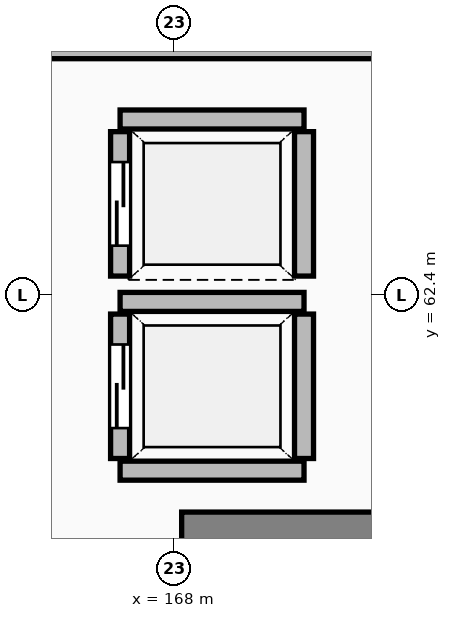
"""IFC4 building model, lengths in metres.
Left out: names, types, materials, properties, quantities, classifications, styles, units other than length and angle.
Written with IfcOpenShell. Run it as: python <this file> out.ifc"""

import sys

from ifc_helpers import new_model, si_unit, direction, frame, frame_2d, origin, place, context, subcontext, project, spatial, rectangle, extrude, element, fill, save


model = new_model("IFC4")
c1 = context("Model", 3, precision=1e-05, world=origin(), true_north=direction((0.0, 1.0)))
c2 = subcontext(c1, "Body", "Model", "MODEL_VIEW")
j1 = project(units=[si_unit("LENGTHUNIT", "METRE"), si_unit("PLANEANGLEUNIT", "RADIAN")], contexts=[c1])
p1 = place(None, origin())
s1 = spatial("IfcSite", under=j1, at=p1, CompositionType="ELEMENT")
p2 = place(p1, origin())
s2 = spatial("IfcBuilding", under=s1, at=p2, CompositionType="ELEMENT")
p3 = place(p2, origin())
s3 = spatial("IfcBuildingStorey", under=s2, at=p3, CompositionType="ELEMENT", Elevation=0.0)
p4 = place(p3, frame((168.1, 59.32, 0.0), z_axis=(0.0, 0.0, 1.0), x_axis=(1.0, 0.0, 0.0)))
e1 = element("IfcWall", 1, at=p4, inside=s3, PredefinedType="SHEAR", context=c2, shape_type="SweptSolid", body=[
    extrude(rectangle(XDim=3.67, YDim=0.45, at=frame_2d((1.835, 0.0))), origin(), (0.0, 0.0, 1.0), 5.7),
])
for number, where, z_axis, x_axis in (
    (2, (167.29, 60.09, 0.0), (0.0, 0.0, 1.0), (1.0, 0.0, 0.0)),
    (3, (167.29, 62.31, 0.0), (0.0, 0.0, 1.0), (1.0, 0.0, 0.0)),
):
    element("IfcWall", number, at=place(p3, frame(where, z_axis=z_axis, x_axis=x_axis)), inside=s3, PredefinedType="SOLIDWALL", context=c2, shape_type="SweptSolid", body=[
        extrude(rectangle(XDim=2.42, YDim=0.25, at=frame_2d((1.21, 0.0))), origin(), (0.0, 0.0, 1.0), 5.7),
    ])
p5 = place(p3, frame((167.29, 60.25, 0.0), z_axis=(0.0, 0.0, 1.0), x_axis=(0.0, 1.0, 0.0)))
e4 = element("IfcWall", 4, at=p5, inside=s3, PredefinedType="SOLIDWALL", context=c2, shape_type="SweptSolid", body=[
    extrude(rectangle(XDim=1.9, YDim=0.25, at=frame_2d((0.95, 0.0))), origin(), (0.0, 0.0, 1.0), 5.7),
])
p6 = place(p5, frame((0.4, 0.0, 0.0)))
e5 = element("IfcOpeningElement", 5, at=p6, cuts=e4, PredefinedType="OPENING", context=c2, shape_type="SweptSolid", body=[
    extrude(rectangle(XDim=1.1, YDim=2.2, at=frame_2d((0.55, 1.1))), frame((0.0, 0.137, 0.0), z_axis=(0.0, -1.0, 0.0), x_axis=(1.0, 0.0, 0.0)), (0.0, 0.0, 1.0), 0.274),
])
p7 = place(p3, frame((169.71, 60.25, 0.0), z_axis=(0.0, 0.0, 1.0), x_axis=(0.0, 1.0, 0.0)))
e6 = element("IfcWall", 6, at=p7, inside=s3, PredefinedType="SOLIDWALL", context=c2, shape_type="SweptSolid", body=[
    extrude(rectangle(XDim=1.9, YDim=0.25, at=frame_2d((0.95, 0.0))), origin(), (0.0, 0.0, 1.0), 5.7),
])
p8 = place(p3, frame((167.29, 64.71, 0.0), z_axis=(0.0, 0.0, 1.0), x_axis=(1.0, 0.0, 0.0)))
e7 = element("IfcWall", 7, at=p8, inside=s3, PredefinedType="SOLIDWALL", context=c2, shape_type="SweptSolid", body=[
    extrude(rectangle(XDim=2.42, YDim=0.25, at=frame_2d((1.21, 0.0))), origin(), (0.0, 0.0, 1.0), 5.7),
])
p9 = place(p3, frame((167.29, 62.65, 0.0), z_axis=(0.0, 0.0, 1.0), x_axis=(0.0, 1.0, 0.0)))
e8 = element("IfcWall", 8, at=p9, inside=s3, PredefinedType="SOLIDWALL", context=c2, shape_type="SweptSolid", body=[
    extrude(rectangle(XDim=1.9, YDim=0.25, at=frame_2d((0.95, 0.0))), origin(), (0.0, 0.0, 1.0), 5.7),
])
p10 = place(p9, frame((0.4, 0.0, 0.0)))
e9 = element("IfcOpeningElement", 9, at=p10, cuts=e8, PredefinedType="OPENING", context=c2, shape_type="SweptSolid", body=[
    extrude(rectangle(XDim=1.1, YDim=2.2, at=frame_2d((0.55, 1.1))), frame((0.0, 0.137, 0.0), z_axis=(0.0, -1.0, 0.0), x_axis=(1.0, 0.0, 0.0)), (0.0, 0.0, 1.0), 0.274),
])
p11 = place(p3, frame((169.71, 62.65, 0.0), z_axis=(0.0, 0.0, 1.0), x_axis=(0.0, 1.0, 0.0)))
e10 = element("IfcWall", 10, at=p11, inside=s3, PredefinedType="SOLIDWALL", context=c2, shape_type="SweptSolid", body=[
    extrude(rectangle(XDim=1.9, YDim=0.25, at=frame_2d((0.95, 0.0))), origin(), (0.0, 0.0, 1.0), 5.7),
])
p12 = place(p3, frame((166.1, 65.6, 0.0), z_axis=(0.0, 0.0, 1.0), x_axis=(1.0, 0.0, 0.0)))
e11 = element("IfcWall", 11, at=p12, inside=s3, PredefinedType="PARTITIONING", context=c2, shape_type="SweptSolid", body=[
    extrude(rectangle(XDim=13.0, YDim=0.18, at=frame_2d((6.5, 0.0))), origin(), (0.0, 0.0, 1.0), 4.692),
])
p13 = place(p6, origin())
e12 = element("IfcDoor", 12, at=p13, inside=s3, OperationType="SLIDING_TO_LEFT", PredefinedType="DOOR", context=c2, shape_type="SweptSolid", body=[
    extrude(rectangle(XDim=1.1, YDim=2.2, at=frame_2d((0.55, 1.1))), frame((0.0, 0.025, 0.0), z_axis=(0.0, -1.0, 0.0), x_axis=(1.0, 0.0, 0.0)), (0.0, 0.0, 1.0), 0.05),
])
fill(e5, e12)
p14 = place(p10, origin())
e13 = element("IfcDoor", 13, at=p14, inside=s3, OperationType="SLIDING_TO_LEFT", PredefinedType="DOOR", context=c2, shape_type="SweptSolid", body=[
    extrude(rectangle(XDim=1.1, YDim=2.2, at=frame_2d((0.55, 1.1))), frame((0.0, 0.025, 0.0), z_axis=(0.0, -1.0, 0.0), x_axis=(1.0, 0.0, 0.0)), (0.0, 0.0, 1.0), 0.05),
])
fill(e9, e13)
save(model, sys.argv[1])
